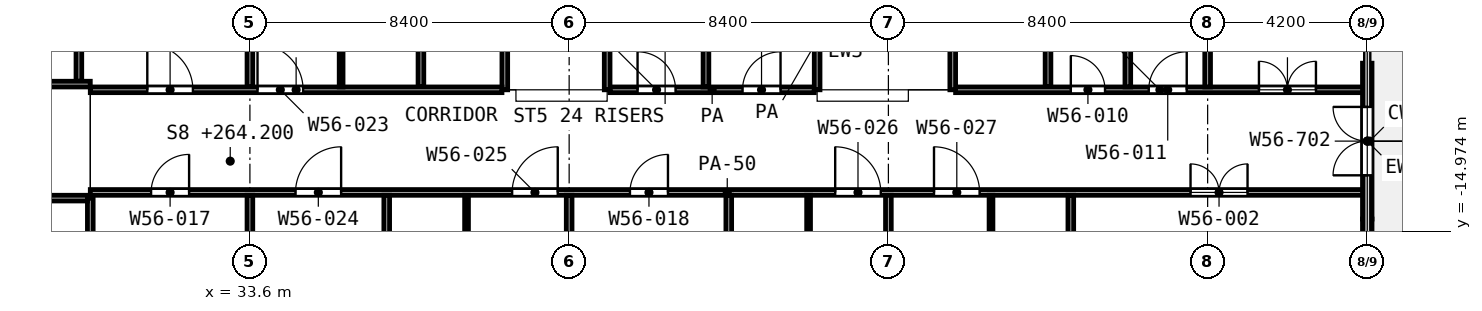
"""IFC4 building model, lengths in metres.
Left out: names, types, materials, properties, quantities, classifications, styles, units other than length and angle.
Written with IfcOpenShell. Run it as: python <this file> out.ifc"""

import sys

from ifc_helpers import new_model, si_unit, direction, frame, frame_2d, origin, place, context, subcontext, project, spatial, rectangle, extrude, element, fill, save


model = new_model("IFC4")
c1 = context("Model", 3, precision=1e-05, world=origin(), true_north=direction((0.0, 1.0)))
c2 = subcontext(c1, "Body", "Model", "MODEL_VIEW")
j1 = project(units=[si_unit("LENGTHUNIT", "METRE"), si_unit("PLANEANGLEUNIT", "RADIAN")], contexts=[c1])
p1 = place(None, origin())
s1 = spatial("IfcSite", under=j1, at=p1, CompositionType="ELEMENT")
p2 = place(p1, origin())
s2 = spatial("IfcBuilding", under=s1, at=p2, CompositionType="ELEMENT")
p3 = place(p2, frame((0.0, 0.0, 264.2)))
s3 = spatial("IfcBuildingStorey", under=s2, at=p3, CompositionType="ELEMENT", Elevation=264.2)
p4 = place(p3, frame((63.0, -18.75, 0.0), z_axis=(0.0, 0.0, 1.0), x_axis=(0.0, 1.0, 0.0)))
e1 = element("IfcWall", 1, at=p4, inside=s3, PredefinedType="SOLIDWALL", context=c2, shape_type="SweptSolid", body=[
    extrude(rectangle(XDim=4.1, YDim=0.25, at=frame_2d((2.05, 0.0))), origin(), (0.0, 0.0, 1.0), 2.58),
])
p5 = place(p4, frame((1.15, 0.0, 0.0)))
e2 = element("IfcOpeningElement", 2, at=p5, cuts=e1, PredefinedType="OPENING", context=c2, shape_type="SweptSolid", body=[
    extrude(rectangle(XDim=1.8, YDim=2.1, at=frame_2d((0.9, 1.05))), frame((0.0, 0.135, 0.0), z_axis=(0.0, -1.0, 0.0), x_axis=(1.0, 0.0, 0.0)), (0.0, 0.0, 1.0), 0.27),
])
p6 = place(p3, frame((63.0, -14.65, 0.0), z_axis=(0.0, 0.0, 1.0), x_axis=(0.0, 1.0, 0.0)))
e3 = element("IfcWall", 3, at=p6, inside=s3, PredefinedType="SOLIDWALL", context=c2, shape_type="SweptSolid", body=[
    extrude(rectangle(XDim=4.1, YDim=0.25, at=frame_2d((2.05, 0.0))), origin(), (0.0, 0.0, 1.0), 2.58),
])
p7 = place(p6, frame((1.15, 0.0, 0.0)))
e4 = element("IfcOpeningElement", 4, at=p7, cuts=e3, PredefinedType="OPENING", context=c2, shape_type="SweptSolid", body=[
    extrude(rectangle(XDim=1.8, YDim=2.1, at=frame_2d((0.9, 1.05))), frame((0.0, 0.135, 0.0), z_axis=(0.0, -1.0, 0.0), x_axis=(1.0, 0.0, 0.0)), (0.0, 0.0, 1.0), 0.27),
])
for number, where, z_axis, x_axis in (
    (5, (36.0, -11.175, 0.0), (0.0, 0.0, 1.0), (0.0, 1.0, 0.0)),
    (6, (39.3, -17.25, 0.0), (0.0, 0.0, 1.0), (0.0, 1.0, 0.0)),
    (7, (48.3, -17.25, 0.0), (0.0, 0.0, 1.0), (0.0, 1.0, 0.0)),
    (8, (53.1, -17.25, 0.0), (0.0, 0.0, 1.0), (0.0, 1.0, 0.0)),
):
    element("IfcWall", number, at=place(p3, frame(where, z_axis=z_axis, x_axis=x_axis)), inside=s3, PredefinedType="PARTITIONING", context=c2, shape_type="SweptSolid", body=[
        extrude(rectangle(XDim=3.225, YDim=0.1, at=frame_2d((1.613, 0.0))), origin(), (0.0, 0.0, 1.0), 3.6),
    ])
p8 = place(p3, frame((24.8, -14.1, 0.0), z_axis=(0.0, 0.0, 1.0), x_axis=(1.0, 0.0, 0.0)))
e9 = element("IfcWall", 9, at=p8, inside=s3, PredefinedType="PARTITIONING", context=c2, shape_type="SweptSolid", body=[
    extrude(rectangle(XDim=4.525, YDim=0.15, at=frame_2d((2.262, 0.0))), origin(), (0.0, 0.0, 1.0), 3.6),
])
p9 = place(p8, frame((1.75, 0.0, 0.0)))
e10 = element("IfcOpeningElement", 10, at=p9, cuts=e9, PredefinedType="OPENING", context=c2, shape_type="SweptSolid", body=[
    extrude(rectangle(XDim=1.5, YDim=2.1, at=frame_2d((0.75, 1.05))), frame((0.0, 0.085, 0.0), z_axis=(0.0, -1.0, 0.0), x_axis=(1.0, 0.0, 0.0)), (0.0, 0.0, 1.0), 0.17),
])
p10 = place(p3, frame((29.4, -13.95, 0.0), z_axis=(0.0, 0.0, 1.0), x_axis=(1.0, 0.0, 0.0)))
e11 = element("IfcWall", 11, at=p10, inside=s3, PredefinedType="PARTITIONING", context=c2, shape_type="SweptSolid", body=[
    extrude(rectangle(XDim=33.52, YDim=0.15, at=frame_2d((16.76, 0.0))), origin(), (0.0, 0.0, 1.0), 2.7),
])
p11 = place(p10, frame((1.6, 0.0, 0.0)))
e12 = element("IfcOpeningElement", 12, at=p11, cuts=e11, PredefinedType="OPENING", context=c2, shape_type="SweptSolid", body=[
    extrude(rectangle(XDim=1.0, YDim=2.1, at=frame_2d((0.5, 1.05))), frame((0.0, 0.085, 0.0), z_axis=(0.0, -1.0, 0.0), x_axis=(1.0, 0.0, 0.0)), (0.0, 0.0, 1.0), 0.17),
])
p12 = place(p10, frame((5.4, 0.0, 0.0)))
e13 = element("IfcOpeningElement", 13, at=p12, cuts=e11, PredefinedType="OPENING", context=c2, shape_type="SweptSolid", body=[
    extrude(rectangle(XDim=1.2, YDim=2.1, at=frame_2d((0.6, 1.05))), frame((0.0, 0.085, 0.0), z_axis=(0.0, -1.0, 0.0), x_axis=(1.0, 0.0, 0.0)), (0.0, 0.0, 1.0), 0.17),
])
p13 = place(p10, frame((11.1, 0.0, 0.0)))
e14 = element("IfcOpeningElement", 14, at=p13, cuts=e11, PredefinedType="OPENING", context=c2, shape_type="SweptSolid", body=[
    extrude(rectangle(XDim=1.2, YDim=2.1, at=frame_2d((0.6, 1.05))), frame((0.0, 0.085, 0.0), z_axis=(0.0, -1.0, 0.0), x_axis=(1.0, 0.0, 0.0)), (0.0, 0.0, 1.0), 0.17),
])
p14 = place(p10, frame((14.2, 0.0, 0.0)))
e15 = element("IfcOpeningElement", 15, at=p14, cuts=e11, PredefinedType="OPENING", context=c2, shape_type="SweptSolid", body=[
    extrude(rectangle(XDim=1.0, YDim=2.1, at=frame_2d((0.5, 1.05))), frame((0.0, 0.085, 0.0), z_axis=(0.0, -1.0, 0.0), x_axis=(1.0, 0.0, 0.0)), (0.0, 0.0, 1.0), 0.17),
])
p15 = place(p10, frame((19.6, 0.0, 0.0)))
e16 = element("IfcOpeningElement", 16, at=p15, cuts=e11, PredefinedType="OPENING", context=c2, shape_type="SweptSolid", body=[
    extrude(rectangle(XDim=1.2, YDim=2.1, at=frame_2d((0.6, 1.05))), frame((0.0, 0.085, 0.0), z_axis=(0.0, -1.0, 0.0), x_axis=(1.0, 0.0, 0.0)), (0.0, 0.0, 1.0), 0.17),
])
p16 = place(p10, frame((22.2, 0.0, 0.0)))
e17 = element("IfcOpeningElement", 17, at=p16, cuts=e11, PredefinedType="OPENING", context=c2, shape_type="SweptSolid", body=[
    extrude(rectangle(XDim=1.2, YDim=2.1, at=frame_2d((0.6, 1.05))), frame((0.0, 0.085, 0.0), z_axis=(0.0, -1.0, 0.0), x_axis=(1.0, 0.0, 0.0)), (0.0, 0.0, 1.0), 0.17),
])
p17 = place(p10, frame((28.95, 0.0, 0.0)))
e18 = element("IfcOpeningElement", 18, at=p17, cuts=e11, PredefinedType="OPENING", context=c2, shape_type="SweptSolid", body=[
    extrude(rectangle(XDim=1.5, YDim=2.1, at=frame_2d((0.75, 1.05))), frame((0.0, 0.085, 0.0), z_axis=(0.0, -1.0, 0.0), x_axis=(1.0, 0.0, 0.0)), (0.0, 0.0, 1.0), 0.17),
])
p18 = place(p3, frame((29.4, -11.25, 0.0), z_axis=(0.0, 0.0, 1.0), x_axis=(1.0, 0.0, 0.0)))
e19 = element("IfcWall", 19, at=p18, inside=s3, PredefinedType="PARTITIONING", context=c2, shape_type="SweptSolid", body=[
    extrude(rectangle(XDim=10.832, YDim=0.15, at=frame_2d((5.416, 0.0))), origin(), (0.0, 0.0, 1.0), 3.6),
])
p19 = place(p18, frame((1.5, 0.0, 0.0)))
e20 = element("IfcOpeningElement", 20, at=p19, cuts=e19, PredefinedType="OPENING", context=c2, shape_type="SweptSolid", body=[
    extrude(rectangle(XDim=1.2, YDim=2.1, at=frame_2d((0.6, 1.05))), frame((0.0, 0.085, 0.0), z_axis=(0.0, -1.0, 0.0), x_axis=(1.0, 0.0, 0.0)), (0.0, 0.0, 1.0), 0.17),
])
p20 = place(p18, frame((4.4, 0.0, 0.0)))
e21 = element("IfcOpeningElement", 21, at=p20, cuts=e19, PredefinedType="OPENING", context=c2, shape_type="SweptSolid", body=[
    extrude(rectangle(XDim=1.2, YDim=2.1, at=frame_2d((0.6, 1.05))), frame((0.0, 0.085, 0.0), z_axis=(0.0, -1.0, 0.0), x_axis=(1.0, 0.0, 0.0)), (0.0, 0.0, 1.0), 0.17),
])
p21 = place(p3, frame((43.075, -11.25, 0.0), z_axis=(0.0, 0.0, 1.0), x_axis=(1.0, 0.0, 0.0)))
e22 = element("IfcWall", 22, at=p21, inside=s3, PredefinedType="PARTITIONING", context=c2, shape_type="SweptSolid", body=[
    extrude(rectangle(XDim=5.375, YDim=0.15, at=frame_2d((2.688, 0.0))), origin(), (0.0, 0.0, 1.0), 3.6),
])
p22 = place(p21, frame((0.725, 0.0, 0.0)))
e23 = element("IfcOpeningElement", 23, at=p22, cuts=e22, PredefinedType="OPENING", context=c2, shape_type="SweptSolid", body=[
    extrude(rectangle(XDim=1.0, YDim=2.1, at=frame_2d((0.5, 1.05))), frame((0.0, 0.085, 0.0), z_axis=(0.0, -1.0, 0.0), x_axis=(1.0, 0.0, 0.0)), (0.0, 0.0, 1.0), 0.17),
])
p23 = place(p21, frame((3.487, 0.0, 0.0)))
e24 = element("IfcOpeningElement", 24, at=p23, cuts=e22, PredefinedType="OPENING", context=c2, shape_type="SweptSolid", body=[
    extrude(rectangle(XDim=1.0, YDim=2.1, at=frame_2d((0.5, 1.05))), frame((0.0, 0.085, 0.0), z_axis=(0.0, -1.0, 0.0), x_axis=(1.0, 0.0, 0.0)), (0.0, 0.0, 1.0), 0.17),
])
p24 = place(p3, frame((52.168, -11.25, 0.0), z_axis=(0.0, 0.0, 1.0), x_axis=(1.0, 0.0, 0.0)))
e25 = element("IfcWall", 25, at=p24, inside=s3, PredefinedType="PARTITIONING", context=c2, shape_type="SweptSolid", body=[
    extrude(rectangle(XDim=10.752, YDim=0.15, at=frame_2d((5.376, 0.0))), origin(), (0.0, 0.0, 1.0), 2.7),
])
p25 = place(p24, frame((3.032, 0.0, 0.0)))
e26 = element("IfcOpeningElement", 26, at=p25, cuts=e25, PredefinedType="OPENING", context=c2, shape_type="SweptSolid", body=[
    extrude(rectangle(XDim=0.9, YDim=2.1, at=frame_2d((0.45, 1.05))), frame((0.0, 0.085, 0.0), z_axis=(0.0, -1.0, 0.0), x_axis=(1.0, 0.0, 0.0)), (0.0, 0.0, 1.0), 0.17),
])
p26 = place(p24, frame((5.082, 0.0, 0.0)))
e27 = element("IfcOpeningElement", 27, at=p26, cuts=e25, PredefinedType="OPENING", context=c2, shape_type="SweptSolid", body=[
    extrude(rectangle(XDim=1.0, YDim=2.1, at=frame_2d((0.5, 1.05))), frame((0.0, 0.085, 0.0), z_axis=(0.0, -1.0, 0.0), x_axis=(1.0, 0.0, 0.0)), (0.0, 0.0, 1.0), 0.17),
])
p27 = place(p24, frame((7.982, 0.0, 0.0)))
e28 = element("IfcOpeningElement", 28, at=p27, cuts=e25, PredefinedType="OPENING", context=c2, shape_type="SweptSolid", body=[
    extrude(rectangle(XDim=1.5, YDim=2.1, at=frame_2d((0.75, 1.05))), frame((0.0, 0.085, 0.0), z_axis=(0.0, -1.0, 0.0), x_axis=(1.0, 0.0, 0.0)), (0.0, 0.0, 1.0), 0.17),
])
p28 = place(p3, frame((24.8, -11.1, 0.0), z_axis=(0.0, 0.0, 1.0), x_axis=(1.0, 0.0, 0.0)))
e29 = element("IfcWall", 29, at=p28, inside=s3, PredefinedType="PARTITIONING", context=c2, shape_type="SweptSolid", body=[
    extrude(rectangle(XDim=4.6, YDim=0.15, at=frame_2d((2.3, 0.0))), origin(), (0.0, 0.0, 1.0), 3.6),
])
p29 = place(p28, frame((1.85, 0.0, 0.0)))
e30 = element("IfcOpeningElement", 30, at=p29, cuts=e29, PredefinedType="OPENING", context=c2, shape_type="SweptSolid", body=[
    extrude(rectangle(XDim=1.0, YDim=2.1, at=frame_2d((0.5, 1.05))), frame((0.0, 0.085, 0.0), z_axis=(0.0, -1.0, 0.0), x_axis=(1.0, 0.0, 0.0)), (0.0, 0.0, 1.0), 0.17),
])
p30 = place(p3, frame((29.1, -11.025, 0.0), z_axis=(0.0, 0.0, 1.0), x_axis=(0.0, 1.0, 0.0)))
e31 = element("IfcWall", 31, at=p30, inside=s3, PredefinedType="PARTITIONING", context=c2, shape_type="SweptSolid", body=[
    extrude(rectangle(XDim=10.945, YDim=0.15, at=frame_2d((5.472, 0.0))), origin(), (0.0, 0.0, 1.0), 3.6),
])
p31 = place(p3, frame((29.4, -25.2, 0.0), z_axis=(0.0, 0.0, 1.0), x_axis=(0.0, 1.0, 0.0)))
e32 = element("IfcWall", 32, at=p31, inside=s3, PredefinedType="PARTITIONING", context=c2, shape_type="SweptSolid", body=[
    extrude(rectangle(XDim=11.1, YDim=0.15, at=frame_2d((5.55, 0.0))), origin(), (0.0, 0.0, 1.0), 3.6),
])
p32 = place(p3, frame((33.6, -25.12, 0.0), z_axis=(0.0, 0.0, 1.0), x_axis=(0.0, 1.0, 0.0)))
e33 = element("IfcWall", 33, at=p32, inside=s3, PredefinedType="PARTITIONING", context=c2, shape_type="SweptSolid", body=[
    extrude(rectangle(XDim=11.095, YDim=0.15, at=frame_2d((5.548, 0.0))), origin(), (0.0, 0.0, 1.0), 3.6),
])
p33 = place(p3, frame((33.6, -11.175, 0.0), z_axis=(0.0, 0.0, 1.0), x_axis=(0.0, 1.0, 0.0)))
e34 = element("IfcWall", 34, at=p33, inside=s3, PredefinedType="PARTITIONING", context=c2, shape_type="SweptSolid", body=[
    extrude(rectangle(XDim=11.095, YDim=0.15, at=frame_2d((5.547, 0.0))), origin(), (0.0, 0.0, 1.0), 3.6),
])
p34 = place(p3, frame((37.2, -25.12, 0.0), z_axis=(0.0, 0.0, 1.0), x_axis=(0.0, 1.0, 0.0)))
e35 = element("IfcWall", 35, at=p34, inside=s3, PredefinedType="PARTITIONING", context=c2, shape_type="SweptSolid", body=[
    extrude(rectangle(XDim=11.095, YDim=0.15, at=frame_2d((5.548, 0.0))), origin(), (0.0, 0.0, 1.0), 3.6),
])
p35 = place(p3, frame((38.1, -11.175, 0.0), z_axis=(0.0, 0.0, 1.0), x_axis=(0.0, 1.0, 0.0)))
e36 = element("IfcWall", 36, at=p35, inside=s3, PredefinedType="PARTITIONING", context=c2, shape_type="SweptSolid", body=[
    extrude(rectangle(XDim=11.095, YDim=0.15, at=frame_2d((5.547, 0.0))), origin(), (0.0, 0.0, 1.0), 3.6),
])
p36 = place(p3, frame((40.307, -11.25, 0.0), z_axis=(0.0, 0.0, 1.0), x_axis=(0.0, 1.0, 0.0)))
e37 = element("IfcWall", 37, at=p36, inside=s3, PredefinedType="PARTITIONING", context=c2, shape_type="SweptSolid", body=[
    extrude(rectangle(XDim=11.17, YDim=0.15, at=frame_2d((5.585, 0.0))), origin(), (0.0, 0.0, 1.0), 3.6),
])
p37 = place(p36, frame((5.125, 0.0, 0.0)))
e38 = element("IfcOpeningElement", 38, at=p37, cuts=e37, PredefinedType="OPENING", context=c2, shape_type="SweptSolid", body=[
    extrude(rectangle(XDim=1.0, YDim=2.1, at=frame_2d((0.5, 1.05))), frame((0.0, 0.085, 0.0), z_axis=(0.0, -1.0, 0.0), x_axis=(1.0, 0.0, 0.0)), (0.0, 0.0, 1.0), 0.17),
])
p38 = place(p3, frame((42.0, -25.12, 0.0), z_axis=(0.0, 0.0, 1.0), x_axis=(0.0, 1.0, 0.0)))
e39 = element("IfcWall", 39, at=p38, inside=s3, PredefinedType="PARTITIONING", context=c2, shape_type="SweptSolid", body=[
    extrude(rectangle(XDim=11.095, YDim=0.15, at=frame_2d((5.548, 0.0))), origin(), (0.0, 0.0, 1.0), 3.6),
])
p39 = place(p3, frame((43.0, -11.25, 0.0), z_axis=(0.0, 0.0, 1.0), x_axis=(0.0, 1.0, 0.0)))
e40 = element("IfcWall", 40, at=p39, inside=s3, PredefinedType="PARTITIONING", context=c2, shape_type="SweptSolid", body=[
    extrude(rectangle(XDim=2.4, YDim=0.15, at=frame_2d((1.2, 0.0))), origin(), (0.0, 0.0, 1.0), 3.6),
])
p40 = place(p3, frame((45.6, -11.175, 0.0), z_axis=(0.0, 0.0, 1.0), x_axis=(0.0, 1.0, 0.0)))
e41 = element("IfcWall", 41, at=p40, inside=s3, PredefinedType="PARTITIONING", context=c2, shape_type="SweptSolid", body=[
    extrude(rectangle(XDim=2.525, YDim=0.15, at=frame_2d((1.263, 0.0))), origin(), (0.0, 0.0, 1.0), 3.6),
])
p41 = place(p3, frame((46.2, -25.12, 0.0), z_axis=(0.0, 0.0, 1.0), x_axis=(0.0, 1.0, 0.0)))
e42 = element("IfcWall", 42, at=p41, inside=s3, PredefinedType="PARTITIONING", context=c2, shape_type="SweptSolid", body=[
    extrude(rectangle(XDim=11.095, YDim=0.15, at=frame_2d((5.548, 0.0))), origin(), (0.0, 0.0, 1.0), 3.6),
])
p42 = place(p3, frame((48.525, -11.25, 0.0), z_axis=(0.0, 0.0, 1.0), x_axis=(0.0, 1.0, 0.0)))
e43 = element("IfcWall", 43, at=p42, inside=s3, PredefinedType="PARTITIONING", context=c2, shape_type="SweptSolid", body=[
    extrude(rectangle(XDim=2.6, YDim=0.15, at=frame_2d((1.3, 0.0))), origin(), (0.0, 0.0, 1.0), 3.6),
])
p43 = place(p3, frame((50.4, -25.12, 0.0), z_axis=(0.0, 0.0, 1.0), x_axis=(0.0, 1.0, 0.0)))
e44 = element("IfcWall", 44, at=p43, inside=s3, PredefinedType="PARTITIONING", context=c2, shape_type="SweptSolid", body=[
    extrude(rectangle(XDim=11.095, YDim=0.15, at=frame_2d((5.548, 0.0))), origin(), (0.0, 0.0, 1.0), 3.6),
])
p44 = place(p3, frame((52.093, -11.25, 0.0), z_axis=(0.0, 0.0, 1.0), x_axis=(0.0, 1.0, 0.0)))
e45 = element("IfcWall", 45, at=p44, inside=s3, PredefinedType="PARTITIONING", context=c2, shape_type="SweptSolid", body=[
    extrude(rectangle(XDim=9.397, YDim=0.15, at=frame_2d((4.698, 0.0))), origin(), (0.0, 0.0, 1.0), 3.6),
])
p45 = place(p44, frame((4.199, 0.0, 0.0)))
e46 = element("IfcOpeningElement", 46, at=p45, cuts=e45, PredefinedType="OPENING", context=c2, shape_type="SweptSolid", body=[
    extrude(rectangle(XDim=1.0, YDim=2.1, at=frame_2d((0.5, 1.05))), frame((0.0, 0.085, 0.0), z_axis=(0.0, -1.0, 0.0), x_axis=(1.0, 0.0, 0.0)), (0.0, 0.0, 1.0), 0.17),
])
p46 = place(p3, frame((54.6, -11.175, 0.0), z_axis=(0.0, 0.0, 1.0), x_axis=(0.0, 1.0, 0.0)))
e47 = element("IfcWall", 47, at=p46, inside=s3, PredefinedType="PARTITIONING", context=c2, shape_type="SweptSolid", body=[
    extrude(rectangle(XDim=11.095, YDim=0.15, at=frame_2d((5.547, 0.0))), origin(), (0.0, 0.0, 1.0), 3.6),
])
p47 = place(p3, frame((55.2, -25.12, 0.0), z_axis=(0.0, 0.0, 1.0), x_axis=(0.0, 1.0, 0.0)))
e48 = element("IfcWall", 48, at=p47, inside=s3, PredefinedType="PARTITIONING", context=c2, shape_type="SweptSolid", body=[
    extrude(rectangle(XDim=11.095, YDim=0.15, at=frame_2d((5.548, 0.0))), origin(), (0.0, 0.0, 1.0), 3.6),
])
p48 = place(p3, frame((56.7, -11.175, 0.0), z_axis=(0.0, 0.0, 1.0), x_axis=(0.0, 1.0, 0.0)))
e49 = element("IfcWall", 49, at=p48, inside=s3, PredefinedType="PARTITIONING", context=c2, shape_type="SweptSolid", body=[
    extrude(rectangle(XDim=10.722, YDim=0.15, at=frame_2d((5.361, 0.0))), origin(), (0.0, 0.0, 1.0), 3.6),
])
p49 = place(p3, frame((58.8, -11.175, 0.0), z_axis=(0.0, 0.0, 1.0), x_axis=(0.0, 1.0, 0.0)))
e50 = element("IfcWall", 50, at=p49, inside=s3, PredefinedType="PARTITIONING", context=c2, shape_type="SweptSolid", body=[
    extrude(rectangle(XDim=2.325, YDim=0.15, at=frame_2d((1.163, 0.0))), origin(), (0.0, 0.0, 1.0), 3.6),
])
p50 = place(p7, origin())
e51 = element("IfcDoor", 51, at=p50, inside=s3, OperationType="DOUBLE_DOOR_SINGLE_SWING", PredefinedType="DOOR", context=c2, shape_type="SweptSolid", body=[
    extrude(rectangle(XDim=1.8, YDim=2.1, at=frame_2d((0.9, 1.05))), frame((0.0, 0.025, 0.0), z_axis=(0.0, -1.0, 0.0), x_axis=(1.0, 0.0, 0.0)), (0.0, 0.0, 1.0), 0.05),
])
fill(e4, e51)
p51 = place(p19, origin())
e52 = element("IfcDoor", 52, at=p51, inside=s3, OperationType="SINGLE_SWING_LEFT", PredefinedType="DOOR", context=c2, shape_type="SweptSolid", body=[
    extrude(rectangle(XDim=1.2, YDim=2.1, at=frame_2d((0.6, 1.05))), frame((0.0, 0.025, 0.0), z_axis=(0.0, -1.0, 0.0), x_axis=(1.0, 0.0, 0.0)), (0.0, 0.0, 1.0), 0.05),
])
fill(e20, e52)
p52 = place(p20, origin())
e53 = element("IfcDoor", 53, at=p52, inside=s3, OperationType="SINGLE_SWING_LEFT", PredefinedType="DOOR", context=c2, shape_type="SweptSolid", body=[
    extrude(rectangle(XDim=1.2, YDim=2.1, at=frame_2d((0.6, 1.05))), frame((0.0, 0.025, 0.0), z_axis=(0.0, -1.0, 0.0), x_axis=(1.0, 0.0, 0.0)), (0.0, 0.0, 1.0), 0.05),
])
fill(e21, e53)
p53 = place(p22, origin())
e54 = element("IfcDoor", 54, at=p53, inside=s3, OperationType="SINGLE_SWING_LEFT", PredefinedType="DOOR", context=c2, shape_type="SweptSolid", body=[
    extrude(rectangle(XDim=1.0, YDim=2.1, at=frame_2d((0.5, 1.05))), frame((0.0, 0.025, 0.0), z_axis=(0.0, -1.0, 0.0), x_axis=(1.0, 0.0, 0.0)), (0.0, 0.0, 1.0), 0.05),
])
fill(e23, e54)
p54 = place(p23, origin())
e55 = element("IfcDoor", 55, at=p54, inside=s3, OperationType="SINGLE_SWING_RIGHT", PredefinedType="DOOR", context=c2, shape_type="SweptSolid", body=[
    extrude(rectangle(XDim=1.0, YDim=2.1, at=frame_2d((0.5, 1.05))), frame((0.0, 0.025, 0.0), z_axis=(0.0, -1.0, 0.0), x_axis=(1.0, 0.0, 0.0)), (0.0, 0.0, 1.0), 0.05),
])
fill(e24, e55)
p55 = place(p11, origin())
e56 = element("IfcDoor", 56, at=p55, inside=s3, OperationType="SINGLE_SWING_RIGHT", PredefinedType="DOOR", context=c2, shape_type="SweptSolid", body=[
    extrude(rectangle(XDim=1.0, YDim=2.1, at=frame_2d((0.5, 1.05))), frame((0.0, 0.025, 0.0), z_axis=(0.0, -1.0, 0.0), x_axis=(1.0, 0.0, 0.0)), (0.0, 0.0, 1.0), 0.05),
])
fill(e12, e56)
p56 = place(p12, origin())
e57 = element("IfcDoor", 57, at=p56, inside=s3, OperationType="SINGLE_SWING_RIGHT", PredefinedType="DOOR", context=c2, shape_type="SweptSolid", body=[
    extrude(rectangle(XDim=1.2, YDim=2.1, at=frame_2d((0.6, 1.05))), frame((0.0, 0.025, 0.0), z_axis=(0.0, -1.0, 0.0), x_axis=(1.0, 0.0, 0.0)), (0.0, 0.0, 1.0), 0.05),
])
fill(e13, e57)
p57 = place(p13, origin())
e58 = element("IfcDoor", 58, at=p57, inside=s3, OperationType="SINGLE_SWING_RIGHT", PredefinedType="DOOR", context=c2, shape_type="SweptSolid", body=[
    extrude(rectangle(XDim=1.2, YDim=2.1, at=frame_2d((0.6, 1.05))), frame((0.0, 0.025, 0.0), z_axis=(0.0, -1.0, 0.0), x_axis=(1.0, 0.0, 0.0)), (0.0, 0.0, 1.0), 0.05),
])
fill(e14, e58)
p58 = place(p14, origin())
e59 = element("IfcDoor", 59, at=p58, inside=s3, OperationType="SINGLE_SWING_RIGHT", PredefinedType="DOOR", context=c2, shape_type="SweptSolid", body=[
    extrude(rectangle(XDim=1.0, YDim=2.1, at=frame_2d((0.5, 1.05))), frame((0.0, 0.025, 0.0), z_axis=(0.0, -1.0, 0.0), x_axis=(1.0, 0.0, 0.0)), (0.0, 0.0, 1.0), 0.05),
])
fill(e15, e59)
p59 = place(p15, origin())
e60 = element("IfcDoor", 60, at=p59, inside=s3, OperationType="SINGLE_SWING_LEFT", PredefinedType="DOOR", context=c2, shape_type="SweptSolid", body=[
    extrude(rectangle(XDim=1.2, YDim=2.1, at=frame_2d((0.6, 1.05))), frame((0.0, 0.025, 0.0), z_axis=(0.0, -1.0, 0.0), x_axis=(1.0, 0.0, 0.0)), (0.0, 0.0, 1.0), 0.05),
])
fill(e16, e60)
p60 = place(p16, origin())
e61 = element("IfcDoor", 61, at=p60, inside=s3, OperationType="SINGLE_SWING_LEFT", PredefinedType="DOOR", context=c2, shape_type="SweptSolid", body=[
    extrude(rectangle(XDim=1.2, YDim=2.1, at=frame_2d((0.6, 1.05))), frame((0.0, 0.025, 0.0), z_axis=(0.0, -1.0, 0.0), x_axis=(1.0, 0.0, 0.0)), (0.0, 0.0, 1.0), 0.05),
])
fill(e17, e61)
p61 = place(p17, origin())
e62 = element("IfcDoor", 62, at=p61, inside=s3, OperationType="DOUBLE_DOOR_SINGLE_SWING", PredefinedType="DOOR", context=c2, shape_type="SweptSolid", body=[
    extrude(rectangle(XDim=1.5, YDim=2.1, at=frame_2d((0.75, 1.05))), frame((0.0, 0.025, 0.0), z_axis=(0.0, -1.0, 0.0), x_axis=(1.0, 0.0, 0.0)), (0.0, 0.0, 1.0), 0.05),
])
fill(e18, e62)
p62 = place(p25, origin())
e63 = element("IfcDoor", 63, at=p62, inside=s3, OperationType="SINGLE_SWING_LEFT", PredefinedType="DOOR", context=c2, shape_type="SweptSolid", body=[
    extrude(rectangle(XDim=0.9, YDim=2.1, at=frame_2d((0.45, 1.05))), frame((0.0, 0.025, 0.0), z_axis=(0.0, -1.0, 0.0), x_axis=(1.0, 0.0, 0.0)), (0.0, 0.0, 1.0), 0.05),
])
fill(e26, e63)
p63 = place(p26, origin())
e64 = element("IfcDoor", 64, at=p63, inside=s3, OperationType="SINGLE_SWING_RIGHT", PredefinedType="DOOR", context=c2, shape_type="SweptSolid", body=[
    extrude(rectangle(XDim=1.0, YDim=2.1, at=frame_2d((0.5, 1.05))), frame((0.0, 0.025, 0.0), z_axis=(0.0, -1.0, 0.0), x_axis=(1.0, 0.0, 0.0)), (0.0, 0.0, 1.0), 0.05),
])
fill(e27, e64)
p64 = place(p27, origin())
e65 = element("IfcDoor", 65, at=p64, inside=s3, OperationType="DOUBLE_DOOR_SINGLE_SWING", PredefinedType="DOOR", context=c2, shape_type="SweptSolid", body=[
    extrude(rectangle(XDim=1.5, YDim=2.1, at=frame_2d((0.75, 1.05))), frame((0.0, 0.025, 0.0), z_axis=(0.0, -1.0, 0.0), x_axis=(1.0, 0.0, 0.0)), (0.0, 0.0, 1.0), 0.05),
])
fill(e28, e65)
save(model, sys.argv[1])
